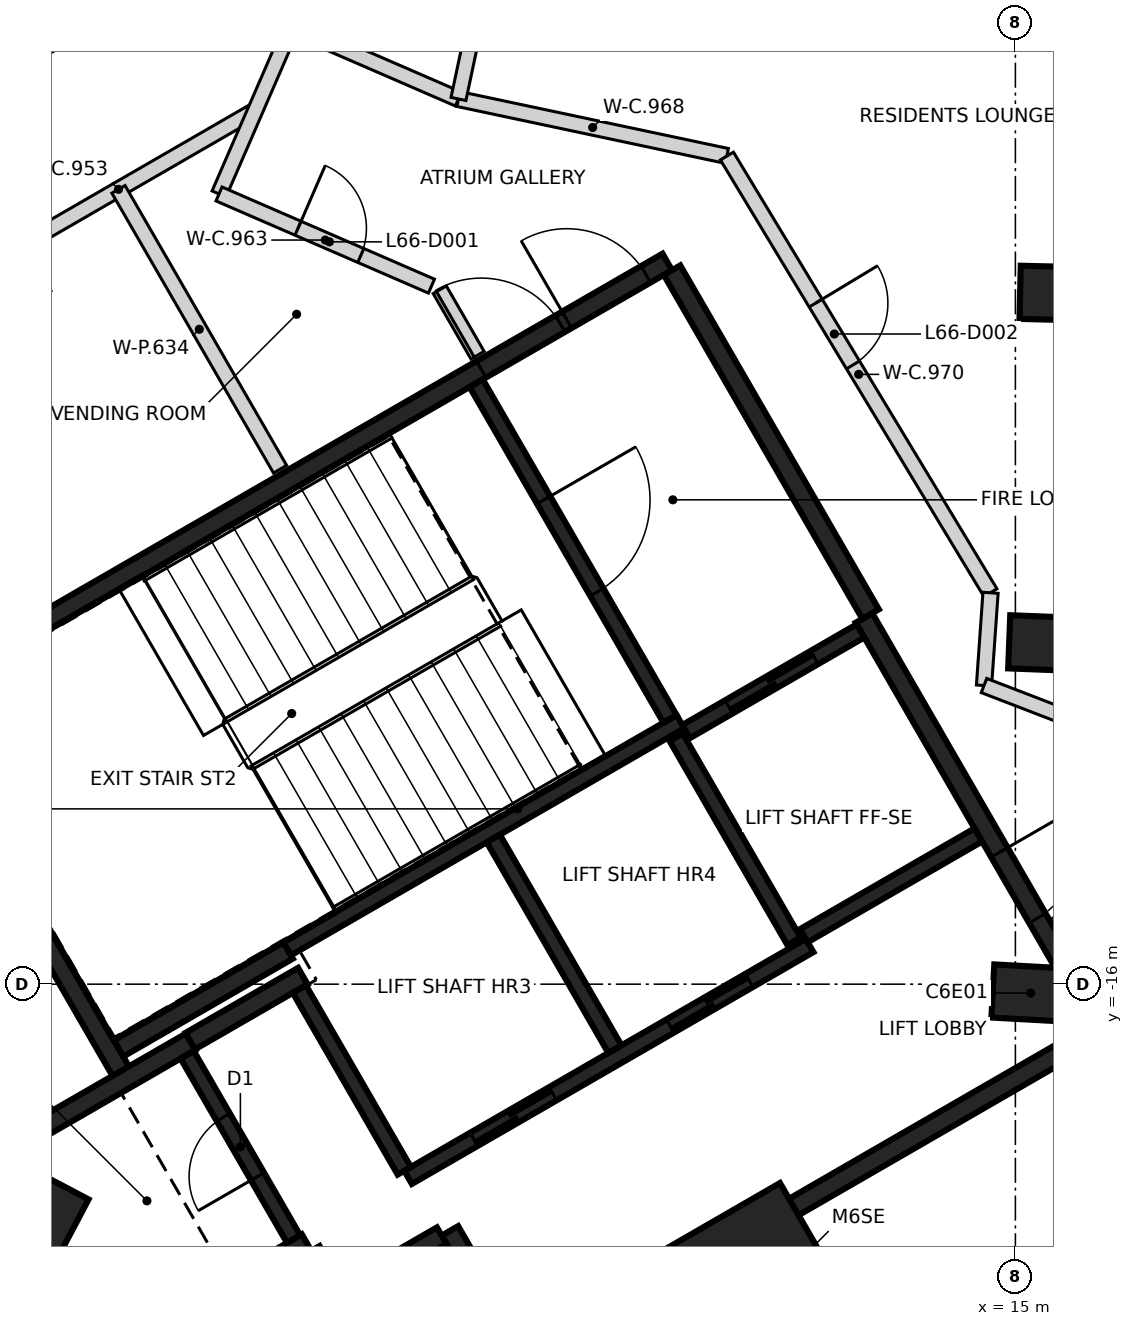
"""IFC4 building model, lengths in metres.
Left out: names, types, materials, properties, quantities, classifications, styles, units other than length and angle.
Written with IfcOpenShell. Run it as: python <this file> out.ifc"""

import sys

from ifc_helpers import new_model, si_unit, direction, frame, frame_2d, origin, origin_2d, place, context, subcontext, project, spatial, rectangle, extrude, element, fill, save


model = new_model("IFC4")
c1 = context("Model", 3, precision=1e-05, world=origin(), true_north=direction((0.0, 1.0)))
c2 = subcontext(c1, "Body", "Model", "MODEL_VIEW")
j1 = project(units=[si_unit("LENGTHUNIT", "METRE"), si_unit("PLANEANGLEUNIT", "RADIAN")], contexts=[c1])
p1 = place(None, origin())
s1 = spatial("IfcSite", under=j1, at=p1, CompositionType="ELEMENT")
p2 = place(p1, origin())
s2 = spatial("IfcBuilding", under=s1, at=p2, CompositionType="ELEMENT")
p3 = place(p2, frame((0.0, 0.0, 262.2)))
s3 = spatial("IfcBuildingStorey", under=s2, at=p3, CompositionType="ELEMENT", Elevation=262.2)
for number, where, z_axis, x_axis in (
    (1, (15.202, -16.117, -0.35), (0.0, 0.0, 1.0), (-0.998, 0.055, 0.0)),
    (2, (15.418, -11.515, -0.35), (0.0, 0.0, 1.0), (-0.999, 0.039, 0.0)),
    (3, (15.562, -6.91, -0.35), (0.0, 0.0, 1.0), (-1.0, 0.024, 0.0)),
    (4, (2.263, -19.11, -0.35), (0.0, 0.0, 1.0), (0.466, 0.885, 0.0)),
):
    element("IfcColumn", number, at=place(p3, frame(where, z_axis=z_axis, x_axis=x_axis)), inside=s3, PredefinedType="COLUMN", context=c2, shape_type="SweptSolid", body=[
        extrude(rectangle(XDim=1.0, YDim=0.7, at=origin_2d()), origin(), (0.0, 0.0, 1.0), 3.6),
    ])
p4 = place(p3, frame((11.637, -20.155, -0.35), z_axis=(0.0, 0.0, 1.0), x_axis=(-0.5, 0.866025403784, 0.0)))
e5 = element("IfcColumn", 5, at=p4, inside=s3, PredefinedType="COLUMN", context=c2, shape_type="SweptSolid", body=[
    extrude(rectangle(XDim=2.4, YDim=2.0, at=origin_2d()), origin(), (0.0, 0.0, 1.0), 3.6),
])
p5 = place(p3, frame((0.417, -12.273, 0.0), z_axis=(0.0, 0.0, 1.0), x_axis=(0.866021906294, 0.500006057782, 0.0)))
e6 = element("IfcWall", 6, at=p5, inside=s3, PredefinedType="SHEAR", context=c2, shape_type="SweptSolid", body=[
    extrude(rectangle(XDim=11.55, YDim=0.25, at=frame_2d((5.775, 0.0))), origin(), (0.0, 0.0, 1.0), 3.25),
])
p6 = place(p5, frame((10.025, 0.0, 0.0)))
e7 = element("IfcOpeningElement", 7, at=p6, cuts=e6, PredefinedType="OPENING", context=c2, shape_type="SweptSolid", body=[
    extrude(rectangle(XDim=1.2, YDim=2.1, at=frame_2d((0.6, 1.05))), frame((0.0, 0.135, 0.0), z_axis=(0.0, -1.0, 0.0), x_axis=(1.0, 0.0, 0.0)), (0.0, 0.0, 1.0), 0.27),
])
p7 = place(p5, frame((8.725, 0.0, 0.0)))
e8 = element("IfcOpeningElement", 8, at=p7, cuts=e6, PredefinedType="OPENING", context=c2, shape_type="SweptSolid", body=[
    extrude(rectangle(XDim=1.2, YDim=2.1, at=frame_2d((0.6, 1.05))), frame((0.0, 0.135, 0.0), z_axis=(0.0, -1.0, 0.0), x_axis=(1.0, 0.0, 0.0)), (0.0, 0.0, 1.0), 0.27),
])
p8 = place(p3, frame((16.133, -16.594, 0.0), z_axis=(0.0, 0.0, 1.0), x_axis=(-0.866022959057, -0.500004234368, 0.0)))
e9 = element("IfcWall", 9, at=p8, inside=s3, PredefinedType="SHEAR", context=c2, shape_type="SweptSolid", body=[
    extrude(rectangle(XDim=8.75, YDim=0.25, at=frame_2d((4.375, 0.0))), origin(), (0.0, 0.0, 1.0), 3.25),
])
p9 = place(p3, frame((13.008, -11.181, 0.0), z_axis=(0.0, 0.0, 1.0), x_axis=(0.500001955336, -0.866024274868, 0.0)))
e10 = element("IfcWall", 10, at=p9, inside=s3, PredefinedType="SHEAR", context=c2, shape_type="SweptSolid", body=[
    extrude(rectangle(XDim=6.125, YDim=0.25, at=frame_2d((3.062, 0.0))), origin(), (0.0, 0.0, 1.0), 3.25),
])
p10 = place(p9, frame((3.563, 0.0, 0.0)))
e11 = element("IfcOpeningElement", 11, at=p10, cuts=e10, PredefinedType="OPENING", context=c2, shape_type="SweptSolid", body=[
    extrude(rectangle(XDim=1.0, YDim=2.1, at=frame_2d((0.5, 1.05))), frame((0.0, 0.135, 0.0), z_axis=(0.0, -1.0, 0.0), x_axis=(1.0, 0.0, 0.0)), (0.0, 0.0, 1.0), 0.27),
])
p11 = place(p3, frame((3.235, -17.153, 0.0), z_axis=(0.0, 0.0, 1.0), x_axis=(-0.500008851346, 0.866020293397, 0.0)))
e12 = element("IfcWall", 12, at=p11, inside=s3, PredefinedType="SHEAR", context=c2, shape_type="SweptSolid", body=[
    extrude(rectangle(XDim=5.51, YDim=0.25, at=frame_2d((2.755, 0.0))), origin(), (0.0, 0.0, 1.0), 3.25),
])
p12 = place(p3, frame((10.483, -6.606, 0.0), z_axis=(0.0, 0.0, 1.0), x_axis=(0.49999885962, -0.866026062182, 0.0)))
e13 = element("IfcWall", 13, at=p12, inside=s3, PredefinedType="SHEAR", context=c2, shape_type="SweptSolid", body=[
    extrude(rectangle(XDim=5.225, YDim=0.25, at=frame_2d((2.612, 0.0))), origin(), (0.0, 0.0, 1.0), 3.25),
])
p13 = place(p3, frame((3.085, -20.894, 0.0), z_axis=(0.0, 0.0, 1.0), x_axis=(-0.499978833458, 0.866037623948, 0.0)))
e14 = element("IfcWall", 14, at=p13, inside=s3, PredefinedType="SHEAR", context=c2, shape_type="SweptSolid", body=[
    extrude(rectangle(XDim=3.05, YDim=0.25, at=frame_2d((1.525, 0.0))), origin(), (0.0, 0.0, 1.0), 3.25),
])
p14 = place(p3, frame((1.669, -18.19, 0.0), z_axis=(0.0, 0.0, 1.0), x_axis=(0.866042235819, 0.499970844928, 0.0)))
e15 = element("IfcWall", 15, at=p14, inside=s3, PredefinedType="SHEAR", context=c2, shape_type="SweptSolid", body=[
    extrude(rectangle(XDim=2.865, YDim=0.25, at=frame_2d((1.432, 0.0))), origin(), (0.0, 0.0, 1.0), 3.25),
])
p15 = place(p3, frame((5.675, -19.399, 0.0), z_axis=(0.0, 0.0, 1.0), x_axis=(-0.866026637627, -0.499997862916, 0.0)))
e16 = element("IfcWall", 16, at=p15, inside=s3, PredefinedType="SHEAR", context=c2, shape_type="SweptSolid", body=[
    extrude(rectangle(XDim=2.865, YDim=0.25, at=frame_2d((1.432, 0.0))), origin(), (0.0, 0.0, 1.0), 3.25),
])
p16 = place(p3, frame((5.431, -15.556, 0.0), z_axis=(0.0, 0.0, 1.0), x_axis=(-0.866022940537, -0.500004266446, 0.0)))
e17 = element("IfcWall", 17, at=p16, inside=s3, PredefinedType="SHEAR", context=c2, shape_type="SweptSolid", body=[
    extrude(rectangle(XDim=2.575, YDim=0.25, at=frame_2d((1.287, 0.0))), origin(), (0.0, 0.0, 1.0), 3.25),
])
p17 = place(p3, frame((8.493, -20.86, 0.0), z_axis=(0.0, 0.0, 1.0), x_axis=(-0.500039802285, 0.866002422705, 0.0)))
e18 = element("IfcWall", 18, at=p17, inside=s3, PredefinedType="SHEAR", context=c2, shape_type="SweptSolid", body=[
    extrude(rectangle(XDim=1.865, YDim=0.25, at=frame_2d((0.932, 0.0))), origin(), (0.0, 0.0, 1.0), 3.25),
])
p18 = place(p3, frame((4.145, -16.749, 0.0), z_axis=(0.0, 0.0, 1.0), x_axis=(0.866038183914, 0.499977863513, 0.0)))
e19 = element("IfcWall", 19, at=p18, inside=s3, PredefinedType="SHEAR", context=c2, shape_type="SweptSolid", body=[
    extrude(rectangle(XDim=1.71, YDim=0.25, at=frame_2d((0.855, 0.0))), origin(), (0.0, 0.0, 1.0), 3.25),
])
p19 = place(p3, frame((7.452, -19.308, 0.0), z_axis=(0.0, 0.0, 1.0), x_axis=(-0.866044474677, -0.49996696679, 0.0)))
e20 = element("IfcWall", 20, at=p19, inside=s3, PredefinedType="SHEAR", context=c2, shape_type="SweptSolid", body=[
    extrude(rectangle(XDim=1.584, YDim=0.25, at=frame_2d((0.792, 0.0))), origin(), (0.0, 0.0, 1.0), 3.25),
])
p20 = place(p3, frame((6.017, -19.992, 0.0), z_axis=(0.0, 0.0, 1.0), x_axis=(-0.500364886717, 0.865814633822, 0.0)))
e21 = element("IfcWall", 21, at=p20, inside=s3, PredefinedType="SHEAR", context=c2, shape_type="SweptSolid", body=[
    extrude(rectangle(XDim=0.559, YDim=0.25, at=frame_2d((0.28, 0.0))), origin(), (0.0, 0.0, 1.0), 3.25),
])
p21 = place(p3, frame((5.419, -15.534, 0.0), z_axis=(0.0, 0.0, 1.0), x_axis=(0.866029065029, 0.499993658486, 0.0)))
e22 = element("IfcWall", 22, at=p21, inside=s3, PredefinedType="SHEAR", context=c2, shape_type="SweptSolid", body=[
    extrude(rectangle(XDim=5.974, YDim=0.2, at=frame_2d((2.987, 0.0))), origin(), (0.0, 0.0, 1.0), 3.25),
])
p22 = place(p3, frame((7.01, -18.542, 0.0), z_axis=(0.0, 0.0, 1.0), x_axis=(0.866030299012, 0.499991521122, 0.0)))
e23 = element("IfcWall", 23, at=p22, inside=s3, PredefinedType="SHEAR", context=c2, shape_type="SweptSolid", body=[
    extrude(rectangle(XDim=6.1, YDim=0.2, at=frame_2d((3.05, 0.0))), origin(), (0.0, 0.0, 1.0), 3.25),
])
p23 = place(p22, frame((1.0, 0.0, 0.0)))
e24 = element("IfcOpeningElement", 24, at=p23, cuts=e23, PredefinedType="OPENING", context=c2, shape_type="SweptSolid", body=[
    extrude(rectangle(XDim=1.2, YDim=2.1, at=frame_2d((0.6, 1.05))), frame((0.0, 0.11, 0.0), z_axis=(0.0, -1.0, 0.0), x_axis=(1.0, 0.0, 0.0)), (0.0, 0.0, 1.0), 0.22),
])
p24 = place(p22, frame((3.982, 0.0, 0.0)))
e25 = element("IfcOpeningElement", 25, at=p24, cuts=e23, PredefinedType="OPENING", context=c2, shape_type="SweptSolid", body=[
    extrude(rectangle(XDim=1.2, YDim=2.1, at=frame_2d((0.6, 1.05))), frame((0.0, 0.11, 0.0), z_axis=(0.0, -1.0, 0.0), x_axis=(1.0, 0.0, 0.0)), (0.0, 0.0, 1.0), 0.22),
])
p25 = place(p3, frame((7.906, -8.094, 0.0), z_axis=(0.0, 0.0, 1.0), x_axis=(0.500027839223, -0.866009330205, 0.0)))
e26 = element("IfcWall", 26, at=p25, inside=s3, PredefinedType="SHEAR", context=c2, shape_type="SweptSolid", body=[
    extrude(rectangle(XDim=5.098, YDim=0.2, at=frame_2d((2.549, 0.0))), origin(), (0.0, 0.0, 1.0), 3.25),
])
p26 = place(p25, frame((1.774, 0.0, 0.0)))
e27 = element("IfcOpeningElement", 27, at=p26, cuts=e26, PredefinedType="OPENING", context=c2, shape_type="SweptSolid", body=[
    extrude(rectangle(XDim=1.4, YDim=2.1, at=frame_2d((0.7, 1.05))), frame((0.0, 0.11, 0.0), z_axis=(0.0, -1.0, 0.0), x_axis=(1.0, 0.0, 0.0)), (0.0, 0.0, 1.0), 0.22),
])
p27 = place(p3, frame((8.132, -14.084, 0.0), z_axis=(0.0, 0.0, 1.0), x_axis=(0.499997778408, -0.866026686418, 0.0)))
e28 = element("IfcWall", 28, at=p27, inside=s3, PredefinedType="SHEAR", context=c2, shape_type="SweptSolid", body=[
    extrude(rectangle(XDim=3.198, YDim=0.2, at=frame_2d((1.599, 0.0))), origin(), (0.0, 0.0, 1.0), 3.25),
])
p28 = place(p3, frame((5.503, -19.352, 0.0), z_axis=(0.0, 0.0, 1.0), x_axis=(-0.499986818241, 0.866033014143, 0.0)))
e29 = element("IfcWall", 29, at=p28, inside=s3, PredefinedType="SHEAR", context=c2, shape_type="SweptSolid", body=[
    extrude(rectangle(XDim=2.798, YDim=0.2, at=frame_2d((1.399, 0.0))), origin(), (0.0, 0.0, 1.0), 3.25),
])
p29 = place(p28, frame((0.949, 0.0, 0.0)))
e30 = element("IfcOpeningElement", 30, at=p29, cuts=e29, PredefinedType="OPENING", context=c2, shape_type="SweptSolid", body=[
    extrude(rectangle(XDim=0.9, YDim=2.1, at=frame_2d((0.45, 1.05))), frame((0.0, 0.11, 0.0), z_axis=(0.0, -1.0, 0.0), x_axis=(1.0, 0.0, 0.0)), (0.0, 0.0, 1.0), 0.22),
])
p30 = place(p3, frame((6.96, -18.455, 0.0), z_axis=(0.0, 0.0, 1.0), x_axis=(-0.499926705758, 0.866067716099, 0.0)))
e31 = element("IfcWall", 31, at=p30, inside=s3, PredefinedType="SHEAR", context=c2, shape_type="SweptSolid", body=[
    extrude(rectangle(XDim=2.759, YDim=0.2, at=frame_2d((1.38, 0.0))), origin(), (0.0, 0.0, 1.0), 3.25),
])
p31 = place(p3, frame((12.088, -15.437, 0.0), z_axis=(0.0, 0.0, 1.0), x_axis=(-0.500026960575, 0.86600983753, 0.0)))
e32 = element("IfcWall", 32, at=p31, inside=s3, PredefinedType="SHEAR", context=c2, shape_type="SweptSolid", body=[
    extrude(rectangle(XDim=3.1, YDim=0.2, at=frame_2d((1.55, 0.0))), origin(), (0.0, 0.0, 1.0), 3.25),
])
p32 = place(p3, frame((10.666, -12.678, 0.0), z_axis=(0.0, 0.0, 1.0), x_axis=(0.866018407898, 0.500012117035, 0.0)))
e33 = element("IfcWall", 33, at=p32, inside=s3, PredefinedType="SHEAR", context=c2, shape_type="SweptSolid", body=[
    extrude(rectangle(XDim=2.651, YDim=0.2, at=frame_2d((1.325, 0.0))), origin(), (0.0, 0.0, 1.0), 3.25),
])
p33 = place(p32, frame((0.652, 0.0, 0.0)))
e34 = element("IfcOpeningElement", 34, at=p33, cuts=e33, PredefinedType="OPENING", context=c2, shape_type="SweptSolid", body=[
    extrude(rectangle(XDim=1.3, YDim=2.1, at=frame_2d((0.65, 1.05))), frame((0.0, 0.11, 0.0), z_axis=(0.0, -1.0, 0.0), x_axis=(1.0, 0.0, 0.0)), (0.0, 0.0, 1.0), 0.22),
])
p34 = place(p3, frame((14.512, -14.037, 0.0), z_axis=(0.0, 0.0, 1.0), x_axis=(-0.866018407898, -0.500012117035, 0.0)))
e35 = element("IfcWall", 35, at=p34, inside=s3, PredefinedType="SHEAR", context=c2, shape_type="SweptSolid", body=[
    extrude(rectangle(XDim=2.651, YDim=0.2, at=frame_2d((1.325, 0.0))), origin(), (0.0, 0.0, 1.0), 3.25),
])
p35 = place(p3, frame((1.401, -6.583, 0.0), z_axis=(0.0, 0.0, 1.0), x_axis=(0.865818713766, 0.500357826853, 0.0)))
e36 = element("IfcWall", 36, at=p35, inside=s3, PredefinedType="PARTITIONING", context=c2, shape_type="SweptSolid", body=[
    extrude(rectangle(XDim=4.157, YDim=0.2, at=frame_2d((2.079, 0.0))), origin(), (0.0, 0.0, 1.0), 3.25),
])
p36 = place(p3, frame((4.523, -5.604, 0.0), z_axis=(0.0, 0.0, 1.0), x_axis=(0.398033282066, 0.917370975324, 0.0)))
e37 = element("IfcWall", 37, at=p36, inside=s3, PredefinedType="PARTITIONING", context=c2, shape_type="SweptSolid", body=[
    extrude(rectangle(XDim=2.397, YDim=0.2, at=frame_2d((1.198, 0.0))), origin(), (0.0, 0.0, 1.0), 3.25),
])
p37 = place(p3, frame((4.523, -5.604, 0.0), z_axis=(0.0, 0.0, 1.0), x_axis=(0.917390838441, -0.397987499231, 0.0)))
e38 = element("IfcWall", 38, at=p37, inside=s3, PredefinedType="PARTITIONING", context=c2, shape_type="SweptSolid", body=[
    extrude(rectangle(XDim=3.046, YDim=0.2, at=frame_2d((1.523, 0.0))), origin(), (0.0, 0.0, 1.0), 3.25),
])
p38 = place(p37, frame((1.133, 0.0, 0.0)))
e39 = element("IfcOpeningElement", 39, at=p38, cuts=e38, PredefinedType="OPENING", context=c2, shape_type="SweptSolid", body=[
    extrude(rectangle(XDim=0.9, YDim=2.1, at=frame_2d((0.45, 1.05))), frame((0.0, 0.11, 0.0), z_axis=(0.0, -1.0, 0.0), x_axis=(1.0, 0.0, 0.0)), (0.0, 0.0, 1.0), 0.22),
])
p39 = place(p3, frame((5.48, -3.404, 0.0), z_axis=(0.0, 0.0, 1.0), x_axis=(0.917402729571, -0.39796008817, 0.0)))
e40 = element("IfcWall", 40, at=p39, inside=s3, PredefinedType="PARTITIONING", context=c2, shape_type="SweptSolid", body=[
    extrude(rectangle(XDim=2.389, YDim=0.2, at=frame_2d((1.195, 0.0))), origin(), (0.0, 0.0, 1.0), 3.25),
])
p40 = place(p3, frame((7.427, -6.864, 0.0), z_axis=(0.0, 0.0, 1.0), x_axis=(0.499942098031, -0.866058830921, 0.0)))
e41 = element("IfcWall", 41, at=p40, inside=s3, PredefinedType="PARTITIONING", context=c2, shape_type="SweptSolid", body=[
    extrude(rectangle(XDim=0.994, YDim=0.2, at=frame_2d((0.497, 0.0))), origin(), (0.0, 0.0, 1.0), 3.25),
])
p41 = place(p3, frame((7.673, -4.355, 0.0), z_axis=(0.0, 0.0, 1.0), x_axis=(0.978232876952, -0.207510092407, 0.0)))
e42 = element("IfcWall", 42, at=p41, inside=s3, PredefinedType="PARTITIONING", context=c2, shape_type="SweptSolid", body=[
    extrude(rectangle(XDim=3.61, YDim=0.2, at=frame_2d((1.805, 0.0))), origin(), (0.0, 0.0, 1.0), 3.25),
])
p42 = place(p3, frame((7.673, -4.354, 0.0), z_axis=(0.0, 0.0, 1.0), x_axis=(0.207939957157, 0.978141592111, 0.0)))
e43 = element("IfcWall", 43, at=p42, inside=s3, PredefinedType="PARTITIONING", context=c2, shape_type="SweptSolid", body=[
    extrude(rectangle(XDim=2.697, YDim=0.2, at=frame_2d((1.348, 0.0))), origin(), (0.0, 0.0, 1.0), 3.25),
])
p43 = place(p3, frame((11.205, -5.105, 0.0), z_axis=(0.0, 0.0, 1.0), x_axis=(0.516682442017, -0.856177116087, 0.0)))
e44 = element("IfcWall", 44, at=p43, inside=s3, PredefinedType="PARTITIONING", context=c2, shape_type="SweptSolid", body=[
    extrude(rectangle(XDim=6.71, YDim=0.2, at=frame_2d((3.355, 0.0))), origin(), (0.0, 0.0, 1.0), 3.25),
])
p44 = place(p43, frame((2.26, 0.0, 0.0)))
e45 = element("IfcOpeningElement", 45, at=p44, cuts=e44, PredefinedType="OPENING", context=c2, shape_type="SweptSolid", body=[
    extrude(rectangle(XDim=0.95, YDim=2.1, at=frame_2d((0.475, 1.05))), frame((0.0, 0.11, 0.0), z_axis=(0.0, -1.0, 0.0), x_axis=(1.0, 0.0, 0.0)), (0.0, 0.0, 1.0), 0.22),
])
p45 = place(p3, frame((14.587, -12.071, 0.0), z_axis=(0.0, 0.0, 1.0), x_axis=(0.070466777423, 0.997514126857, 0.0)))
e46 = element("IfcWall", 46, at=p45, inside=s3, PredefinedType="PARTITIONING", context=c2, shape_type="SweptSolid", body=[
    extrude(rectangle(XDim=1.223, YDim=0.2, at=frame_2d((0.611, 0.0))), origin(), (0.0, 0.0, 1.0), 3.25),
])
p46 = place(p3, frame((14.587, -12.071, 0.0), z_axis=(0.0, 0.0, 1.0), x_axis=(0.933192153307, -0.359377802606, 0.0)))
e47 = element("IfcWall", 47, at=p46, inside=s3, PredefinedType="PARTITIONING", context=c2, shape_type="SweptSolid", body=[
    extrude(rectangle(XDim=1.149, YDim=0.2, at=frame_2d((0.574, 0.0))), origin(), (0.0, 0.0, 1.0), 2.35),
])
p47 = place(p3, frame((15.55, -15.213, 0.0), z_axis=(0.0, 0.0, 1.0), x_axis=(0.865989998118, 0.500061319399, 0.0)))
e48 = element("IfcWall", 48, at=p47, inside=s3, PredefinedType="PARTITIONING", context=c2, shape_type="SweptSolid", body=[
    extrude(rectangle(XDim=0.79, YDim=0.2, at=frame_2d((0.395, 0.0))), origin(), (0.0, 0.0, 1.0), 3.25),
])
p48 = place(p3, frame((3.2, -5.543, 0.0), z_axis=(0.0, 0.0, 1.0), x_axis=(0.500060428066, -0.865990512813, 0.0)))
e49 = element("IfcWall", 49, at=p48, inside=s3, PredefinedType="PARTITIONING", context=c2, shape_type="SweptSolid", body=[
    extrude(rectangle(XDim=4.252, YDim=0.2, at=frame_2d((2.126, 0.0))), origin(), (0.0, 0.0, 1.0), 3.25),
])
p49 = place(p33, origin())
e50 = element("IfcDoor", 50, at=p49, inside=s3, OperationType="SLIDING_TO_RIGHT", PredefinedType="DOOR", context=c2, shape_type="SweptSolid", body=[
    extrude(rectangle(XDim=1.3, YDim=2.1, at=frame_2d((0.65, 1.05))), frame((0.0, 0.025, 0.0), z_axis=(0.0, -1.0, 0.0), x_axis=(1.0, 0.0, 0.0)), (0.0, 0.0, 1.0), 0.05),
])
fill(e34, e50)
p50 = place(p23, origin())
e51 = element("IfcDoor", 51, at=p50, inside=s3, OperationType="DOUBLE_DOOR_SLIDING", PredefinedType="DOOR", context=c2, shape_type="SweptSolid", body=[
    extrude(rectangle(XDim=1.2, YDim=2.1, at=frame_2d((0.6, 1.05))), frame((0.0, 0.025, 0.0), z_axis=(0.0, -1.0, 0.0), x_axis=(1.0, 0.0, 0.0)), (0.0, 0.0, 1.0), 0.05),
])
fill(e24, e51)
p51 = place(p24, origin())
e52 = element("IfcDoor", 52, at=p51, inside=s3, OperationType="DOUBLE_DOOR_SLIDING", PredefinedType="DOOR", context=c2, shape_type="SweptSolid", body=[
    extrude(rectangle(XDim=1.2, YDim=2.1, at=frame_2d((0.6, 1.05))), frame((0.0, 0.025, 0.0), z_axis=(0.0, -1.0, 0.0), x_axis=(1.0, 0.0, 0.0)), (0.0, 0.0, 1.0), 0.05),
])
fill(e25, e52)
p52 = place(p10, origin())
e53 = element("IfcDoor", 53, at=p52, inside=s3, OperationType="SINGLE_SWING_LEFT", PredefinedType="DOOR", context=c2, shape_type="SweptSolid", body=[
    extrude(rectangle(XDim=1.0, YDim=2.1, at=frame_2d((0.5, 1.05))), frame((0.0, 0.025, 0.0), z_axis=(0.0, -1.0, 0.0), x_axis=(1.0, 0.0, 0.0)), (0.0, 0.0, 1.0), 0.05),
])
fill(e11, e53)
p53 = place(p6, origin())
e54 = element("IfcDoor", 54, at=p53, inside=s3, OperationType="SINGLE_SWING_LEFT", PredefinedType="DOOR", context=c2, shape_type="SweptSolid", body=[
    extrude(rectangle(XDim=1.2, YDim=2.1, at=frame_2d((0.6, 1.05))), frame((0.0, 0.025, 0.0), z_axis=(0.0, -1.0, 0.0), x_axis=(1.0, 0.0, 0.0)), (0.0, 0.0, 1.0), 0.05),
])
fill(e7, e54)
p54 = place(p7, origin())
e55 = element("IfcDoor", 55, at=p54, inside=s3, OperationType="SINGLE_SWING_RIGHT", PredefinedType="DOOR", context=c2, shape_type="SweptSolid", body=[
    extrude(rectangle(XDim=1.2, YDim=2.1, at=frame_2d((0.6, 1.05))), frame((0.0, 0.025, 0.0), z_axis=(0.0, -1.0, 0.0), x_axis=(1.0, 0.0, 0.0)), (0.0, 0.0, 1.0), 0.05),
])
fill(e8, e55)
p55 = place(p26, origin())
e56 = element("IfcDoor", 56, at=p55, inside=s3, OperationType="SINGLE_SWING_RIGHT", PredefinedType="DOOR", context=c2, shape_type="SweptSolid", body=[
    extrude(rectangle(XDim=1.4, YDim=2.1, at=frame_2d((0.7, 1.05))), frame((0.0, 0.025, 0.0), z_axis=(0.0, -1.0, 0.0), x_axis=(1.0, 0.0, 0.0)), (0.0, 0.0, 1.0), 0.05),
])
fill(e27, e56)
p56 = place(p29, origin())
e57 = element("IfcDoor", 57, at=p56, inside=s3, OperationType="SINGLE_SWING_LEFT", PredefinedType="DOOR", context=c2, shape_type="SweptSolid", body=[
    extrude(rectangle(XDim=0.9, YDim=2.1, at=frame_2d((0.45, 1.05))), frame((0.0, 0.025, 0.0), z_axis=(0.0, -1.0, 0.0), x_axis=(1.0, 0.0, 0.0)), (0.0, 0.0, 1.0), 0.05),
])
fill(e30, e57)
p57 = place(p38, frame((0.9, 0.0, 0.0), z_axis=(0.0, 0.0, 1.0), x_axis=(-1.0, 0.0, 0.0)))
e58 = element("IfcDoor", 58, at=p57, inside=s3, OperationType="SINGLE_SWING_LEFT", PredefinedType="DOOR", context=c2, shape_type="SweptSolid", body=[
    extrude(rectangle(XDim=0.9, YDim=2.1, at=frame_2d((0.45, 1.05))), frame((0.0, 0.025, 0.0), z_axis=(0.0, -1.0, 0.0), x_axis=(1.0, 0.0, 0.0)), (0.0, 0.0, 1.0), 0.05),
])
fill(e39, e58)
p58 = place(p44, origin())
e59 = element("IfcDoor", 59, at=p58, inside=s3, OperationType="SINGLE_SWING_LEFT", PredefinedType="DOOR", context=c2, shape_type="SweptSolid", body=[
    extrude(rectangle(XDim=0.95, YDim=2.1, at=frame_2d((0.475, 1.05))), frame((0.0, 0.025, 0.0), z_axis=(0.0, -1.0, 0.0), x_axis=(1.0, 0.0, 0.0)), (0.0, 0.0, 1.0), 0.05),
])
fill(e45, e59)
save(model, sys.argv[1])
